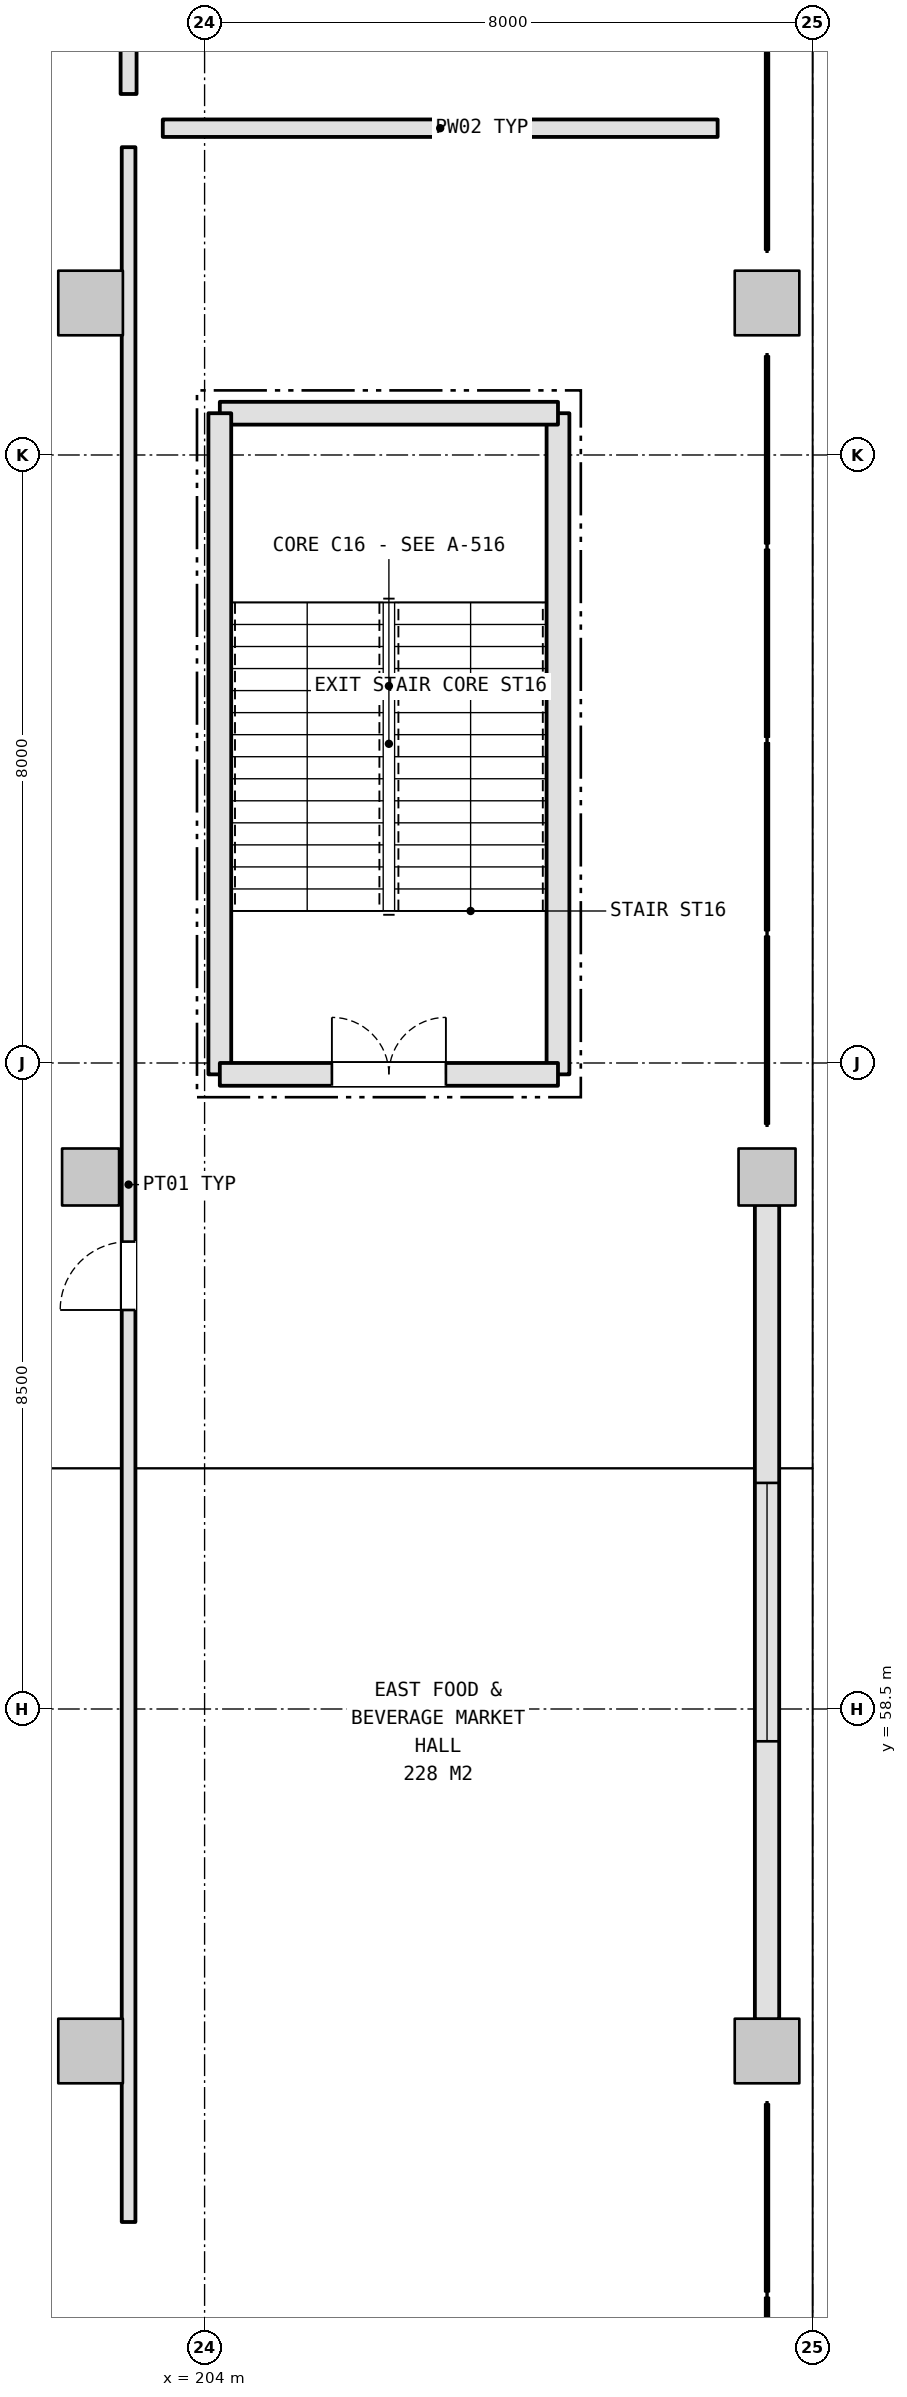
"""IFC4 building model, lengths in metres.
Left out: names, types, materials, properties, quantities, classifications, styles, units other than length and angle.
Written with IfcOpenShell. Run it as: python <this file> out.ifc"""

import sys

from ifc_helpers import new_model, si_unit, direction, frame, frame_2d, origin, origin_2d, place, context, subcontext, project, spatial, rectangle, extrude, element, fill, save


model = new_model("IFC4")
c1 = context("Model", 3, precision=1e-05, world=origin(), true_north=direction((0.0, 1.0)))
c2 = subcontext(c1, "Body", "Model", "MODEL_VIEW")
j1 = project(units=[si_unit("LENGTHUNIT", "METRE"), si_unit("PLANEANGLEUNIT", "RADIAN")], contexts=[c1])
p1 = place(None, origin())
s1 = spatial("IfcSite", under=j1, at=p1, CompositionType="ELEMENT")
p2 = place(p1, origin())
s2 = spatial("IfcBuilding", under=s1, at=p2, CompositionType="ELEMENT")
p3 = place(p2, frame((0.0, 0.0, 5.4)))
s3 = spatial("IfcBuildingStorey", under=s2, at=p3, CompositionType="ELEMENT", Elevation=5.4)
p4 = place(p3, frame((202.5, 54.0, 0.0), z_axis=(0.0, 0.0, 1.0), x_axis=(1.0, 0.0, 0.0)))
e1 = element("IfcColumn", 1, at=p4, inside=s3, PredefinedType="COLUMN", context=c2, shape_type="SweptSolid", body=[
    extrude(rectangle(XDim=0.85, YDim=0.85, at=origin_2d()), origin(), (0.0, 0.0, 1.0), 5.4),
])
p5 = place(p3, frame((202.5, 65.5, 0.0), z_axis=(0.0, 0.0, 1.0), x_axis=(1.0, 0.0, 0.0)))
e2 = element("IfcColumn", 2, at=p5, inside=s3, PredefinedType="COLUMN", context=c2, shape_type="SweptSolid", body=[
    extrude(rectangle(XDim=0.75, YDim=0.75, at=origin_2d()), origin(), (0.0, 0.0, 1.0), 5.4),
])
for number, where, z_axis, x_axis in (
    (3, (202.5, 77.0, 0.0), (0.0, 0.0, 1.0), (1.0, 0.0, 0.0)),
    (4, (211.4, 54.0, 0.0), (0.0, 0.0, 1.0), (1.0, 0.0, 0.0)),
):
    element("IfcColumn", number, at=place(p3, frame(where, z_axis=z_axis, x_axis=x_axis)), inside=s3, PredefinedType="COLUMN", context=c2, shape_type="SweptSolid", body=[
        extrude(rectangle(XDim=0.85, YDim=0.85, at=origin_2d()), origin(), (0.0, 0.0, 1.0), 5.4),
    ])
p6 = place(p3, frame((211.4, 65.5, 0.0), z_axis=(0.0, 0.0, 1.0), x_axis=(1.0, 0.0, 0.0)))
e5 = element("IfcColumn", 5, at=p6, inside=s3, PredefinedType="COLUMN", context=c2, shape_type="SweptSolid", body=[
    extrude(rectangle(XDim=0.75, YDim=0.75, at=origin_2d()), origin(), (0.0, 0.0, 1.0), 5.4),
])
p7 = place(p3, frame((211.4, 77.0, 0.0), z_axis=(0.0, 0.0, 1.0), x_axis=(1.0, 0.0, 0.0)))
e6 = element("IfcColumn", 6, at=p7, inside=s3, PredefinedType="COLUMN", context=c2, shape_type="SweptSolid", body=[
    extrude(rectangle(XDim=0.85, YDim=0.85, at=origin_2d()), origin(), (0.0, 0.0, 1.0), 5.4),
])
p8 = place(p3, frame((211.4, 54.413, 0.0), z_axis=(0.0, 0.0, 1.0), x_axis=(0.0, 1.0, 0.0)))
e7 = element("IfcWall", 7, at=p8, inside=s3, PredefinedType="SOLIDWALL", context=c2, shape_type="SweptSolid", body=[
    extrude(rectangle(XDim=10.724, YDim=0.32, at=frame_2d((5.362, 0.0))), origin(), (0.0, 0.0, 1.0), 4.475),
])
p9 = place(p8, frame((3.662, 0.0, 1.2)))
e8 = element("IfcOpeningElement", 8, at=p9, cuts=e7, PredefinedType="OPENING", context=c2, shape_type="SweptSolid", body=[
    extrude(rectangle(XDim=3.4, YDim=1.5, at=frame_2d((1.7, 0.75))), frame((0.0, 0.17, 0.0), z_axis=(0.0, -1.0, 0.0), x_axis=(1.0, 0.0, 0.0)), (0.0, 0.0, 1.0), 0.34),
])
p10 = place(p3, frame((208.65, 66.85, 0.0), z_axis=(0.0, 0.0, 1.0), x_axis=(0.0, 1.0, 0.0)))
e9 = element("IfcWall", 9, at=p10, inside=s3, PredefinedType="SHEAR", context=c2, shape_type="SweptSolid", body=[
    extrude(rectangle(XDim=8.699, YDim=0.3, at=frame_2d((4.35, 0.0))), origin(), (0.0, 0.0, 1.0), 5.14),
])
p11 = place(p3, frame((208.65, 75.55, 0.0), z_axis=(0.0, 0.0, 1.0), x_axis=(-1.0, 0.0, 0.0)))
e10 = element("IfcWall", 10, at=p11, inside=s3, PredefinedType="SHEAR", context=c2, shape_type="SweptSolid", body=[
    extrude(rectangle(XDim=4.449, YDim=0.3, at=frame_2d((2.225, 0.0))), origin(), (0.0, 0.0, 1.0), 5.14),
])
p12 = place(p3, frame((204.2, 75.55, 0.0), z_axis=(0.0, 0.0, 1.0), x_axis=(0.0, -1.0, 0.0)))
e11 = element("IfcWall", 11, at=p12, inside=s3, PredefinedType="SHEAR", context=c2, shape_type="SweptSolid", body=[
    extrude(rectangle(XDim=8.699, YDim=0.3, at=frame_2d((4.35, 0.0))), origin(), (0.0, 0.0, 1.0), 5.14),
])
p13 = place(p3, frame((204.2, 66.85, 0.0), z_axis=(0.0, 0.0, 1.0), x_axis=(1.0, 0.0, 0.0)))
e12 = element("IfcWall", 12, at=p13, inside=s3, PredefinedType="SHEAR", context=c2, shape_type="SweptSolid", body=[
    extrude(rectangle(XDim=4.449, YDim=0.3, at=frame_2d((2.225, 0.0))), origin(), (0.0, 0.0, 1.0), 5.14),
])
p14 = place(p13, frame((1.475, 0.0, 0.0)))
e13 = element("IfcOpeningElement", 13, at=p14, cuts=e12, PredefinedType="OPENING", context=c2, shape_type="SweptSolid", body=[
    extrude(rectangle(XDim=1.5, YDim=2.2, at=frame_2d((0.75, 1.1))), frame((0.0, 0.16, 0.0), z_axis=(0.0, -1.0, 0.0), x_axis=(1.0, 0.0, 0.0)), (0.0, 0.0, 1.0), 0.32),
])
p15 = place(p3, frame((203.0, 51.75, 0.0), z_axis=(0.0, 0.0, 1.0), x_axis=(0.0, 1.0, 0.0)))
e14 = element("IfcWall", 14, at=p15, inside=s3, PredefinedType="PARTITIONING", context=c2, shape_type="SweptSolid", body=[
    extrude(rectangle(XDim=27.3, YDim=0.18, at=frame_2d((13.65, 0.0))), origin(), (0.0, 0.0, 1.0), 4.625),
])
p16 = place(p15, frame((12.0, 0.0, 0.0)))
e15 = element("IfcOpeningElement", 15, at=p16, cuts=e14, PredefinedType="OPENING", context=c2, shape_type="SweptSolid", body=[
    extrude(rectangle(XDim=0.9, YDim=2.1, at=frame_2d((0.45, 1.05))), frame((0.0, 0.1, 0.0), z_axis=(0.0, -1.0, 0.0), x_axis=(1.0, 0.0, 0.0)), (0.0, 0.0, 1.0), 0.2),
])
p17 = place(p3, frame((203.45, 79.3, 0.0), z_axis=(0.0, 0.0, 1.0), x_axis=(1.0, 0.0, 0.0)))
e16 = element("IfcWall", 16, at=p17, inside=s3, PredefinedType="PLUMBINGWALL", context=c2, shape_type="SweptSolid", body=[
    extrude(rectangle(XDim=7.3, YDim=0.23, at=frame_2d((3.65, 0.0))), origin(), (0.0, 0.0, 1.0), 5.12),
])
p18 = place(p3, frame((203.0, 79.75, 0.0), z_axis=(0.0, 0.0, 1.0), x_axis=(0.0, 1.0, 0.0)))
e17 = element("IfcWall", 17, at=p18, inside=s3, PredefinedType="PLUMBINGWALL", context=c2, shape_type="SweptSolid", body=[
    extrude(rectangle(XDim=21.3, YDim=0.21, at=frame_2d((10.65, 0.0))), origin(), (0.0, 0.0, 1.0), 4.625),
])
p19 = place(p18, frame((10.025, 0.0, 0.0)))
e18 = element("IfcOpeningElement", 18, at=p19, cuts=e17, PredefinedType="OPENING", context=c2, shape_type="SweptSolid", body=[
    extrude(rectangle(XDim=1.25, YDim=2.2, at=frame_2d((0.625, 1.1))), frame((0.0, 0.115, 0.0), z_axis=(0.0, -1.0, 0.0), x_axis=(1.0, 0.0, 0.0)), (0.0, 0.0, 1.0), 0.23),
])
p20 = place(p9, origin())
e19 = element("IfcWindow", 19, at=p20, inside=s3, PartitioningType="SINGLE_PANEL", PredefinedType="WINDOW", context=c2, shape_type="SweptSolid", body=[
    extrude(rectangle(XDim=3.4, YDim=1.5, at=frame_2d((1.7, 0.75))), frame((0.0, 0.03, 0.0), z_axis=(0.0, -1.0, 0.0), x_axis=(1.0, 0.0, 0.0)), (0.0, 0.0, 1.0), 0.06),
])
fill(e8, e19)
p21 = place(p14, origin())
e20 = element("IfcDoor", 20, at=p21, inside=s3, OperationType="DOUBLE_DOOR_SINGLE_SWING", PredefinedType="DOOR", context=c2, shape_type="SweptSolid", body=[
    extrude(rectangle(XDim=1.5, YDim=2.2, at=frame_2d((0.75, 1.1))), frame((0.0, 0.025, 0.0), z_axis=(0.0, -1.0, 0.0), x_axis=(1.0, 0.0, 0.0)), (0.0, 0.0, 1.0), 0.05),
])
fill(e13, e20)
p22 = place(p16, origin())
e21 = element("IfcDoor", 21, at=p22, inside=s3, OperationType="SINGLE_SWING_LEFT", PredefinedType="DOOR", context=c2, shape_type="SweptSolid", body=[
    extrude(rectangle(XDim=0.9, YDim=2.1, at=frame_2d((0.45, 1.05))), frame((0.0, 0.025, 0.0), z_axis=(0.0, -1.0, 0.0), x_axis=(1.0, 0.0, 0.0)), (0.0, 0.0, 1.0), 0.05),
])
fill(e15, e21)
save(model, sys.argv[1])
